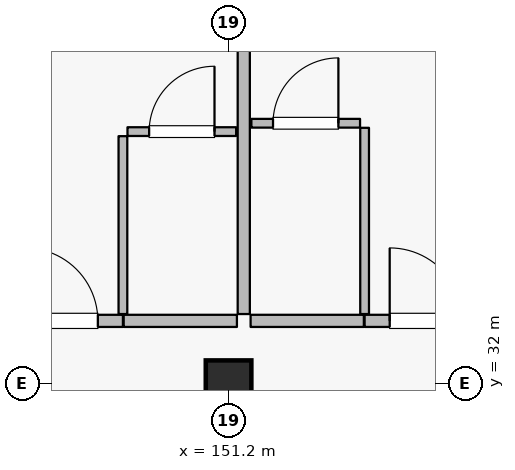
"""IFC4 building model, lengths in metres.
Left out: names, types, materials, properties, quantities, classifications, styles, units other than length and angle.
Written with IfcOpenShell. Run it as: python <this file> out.ifc"""

import sys

from ifc_helpers import new_model, si_unit, direction, frame, frame_2d, origin, origin_2d, place, context, subcontext, project, spatial, rectangle, extrude, element, fill, save


model = new_model("IFC4")
c1 = context("Model", 3, precision=1e-05, world=origin(), true_north=direction((0.0, 1.0)))
c2 = subcontext(c1, "Body", "Model", "MODEL_VIEW")
j1 = project(units=[si_unit("LENGTHUNIT", "METRE"), si_unit("PLANEANGLEUNIT", "RADIAN")], contexts=[c1])
p1 = place(None, origin())
s1 = spatial("IfcSite", under=j1, at=p1, CompositionType="ELEMENT")
p2 = place(p1, origin())
s2 = spatial("IfcBuilding", under=s1, at=p2, CompositionType="ELEMENT")
p3 = place(p2, frame((0.0, 0.0, 32.4)))
s3 = spatial("IfcBuildingStorey", under=s2, at=p3, CompositionType="ELEMENT", Elevation=32.4)
p4 = place(p3, frame((151.2, 32.0, 0.0), z_axis=(0.0, 0.0, 1.0), x_axis=(1.0, 0.0, 0.0)))
e1 = element("IfcColumn", 1, at=p4, inside=s3, PredefinedType="COLUMN", context=c2, shape_type="SweptSolid", body=[
    extrude(rectangle(XDim=0.6, YDim=0.6, at=origin_2d()), origin(), (0.0, 0.0, 1.0), 3.6),
])
p5 = place(p3, frame((143.15, 32.333, 0.0), z_axis=(0.0, 0.0, 1.0), x_axis=(0.724116091282, 0.689678103427, 0.0)))
e2 = element("IfcWall", 2, at=p5, inside=s3, PredefinedType="SOLIDWALL", context=c2, shape_type="SweptSolid", body=[
    extrude(rectangle(XDim=10.634, YDim=0.24, at=frame_2d((5.317, 0.0))), origin(), (0.0, 0.0, 1.0), 2.94),
])
p6 = place(p5, frame((0.27, 0.0, 0.8)))
e3 = element("IfcOpeningElement", 3, at=p6, cuts=e2, PredefinedType="OPENING", context=c2, shape_type="SweptSolid", body=[
    extrude(rectangle(XDim=1.6, YDim=1.6, at=frame_2d((0.8, 0.8))), frame((0.0, 0.13, 0.0), z_axis=(0.0, -1.0, 0.0), x_axis=(1.0, 0.0, 0.0)), (0.0, 0.0, 1.0), 0.26),
])
p7 = place(p5, frame((3.757, 0.0, 0.8)))
e4 = element("IfcOpeningElement", 4, at=p7, cuts=e2, PredefinedType="OPENING", context=c2, shape_type="SweptSolid", body=[
    extrude(rectangle(XDim=1.6, YDim=1.6, at=frame_2d((0.8, 0.8))), frame((0.0, 0.13, 0.0), z_axis=(0.0, -1.0, 0.0), x_axis=(1.0, 0.0, 0.0)), (0.0, 0.0, 1.0), 0.26),
])
p8 = place(p5, frame((8.004, 0.0, 0.8)))
e5 = element("IfcOpeningElement", 5, at=p8, cuts=e2, PredefinedType="OPENING", context=c2, shape_type="SweptSolid", body=[
    extrude(rectangle(XDim=1.6, YDim=1.6, at=frame_2d((0.8, 0.8))), frame((0.0, 0.13, 0.0), z_axis=(0.0, -1.0, 0.0), x_axis=(1.0, 0.0, 0.0)), (0.0, 0.0, 1.0), 0.26),
])
p9 = place(p3, frame((148.19, 32.82, 0.0), z_axis=(0.0, 0.0, 1.0), x_axis=(1.0, 0.0, 0.0)))
e6 = element("IfcWall", 6, at=p9, inside=s3, PredefinedType="PARTITIONING", context=c2, shape_type="SweptSolid", body=[
    extrude(rectangle(XDim=1.62, YDim=0.16, at=frame_2d((0.81, 0.0))), origin(), (0.0, 0.0, 1.0), 3.335),
])
p10 = place(p9, frame((0.33, 0.0, 0.0)))
e7 = element("IfcOpeningElement", 7, at=p10, cuts=e6, PredefinedType="OPENING", context=c2, shape_type="SweptSolid", body=[
    extrude(rectangle(XDim=0.96, YDim=2.2, at=frame_2d((0.48, 1.1))), frame((0.0, 0.09, 0.0), z_axis=(0.0, -1.0, 0.0), x_axis=(1.0, 0.0, 0.0)), (0.0, 0.0, 1.0), 0.18),
])
p11 = place(p3, frame((149.82, 32.82, 0.0), z_axis=(0.0, 0.0, 1.0), x_axis=(1.0, 0.0, 0.0)))
e8 = element("IfcWall", 8, at=p11, inside=s3, PredefinedType="PARTITIONING", context=c2, shape_type="SweptSolid", body=[
    extrude(rectangle(XDim=1.49, YDim=0.16, at=frame_2d((0.745, 0.0))), origin(), (0.0, 0.0, 1.0), 3.335),
])
p12 = place(p3, frame((149.81, 32.91, 0.0), z_axis=(0.0, 0.0, 1.0), x_axis=(0.0, 1.0, 0.0)))
e9 = element("IfcWall", 9, at=p12, inside=s3, PredefinedType="PARTITIONING", context=c2, shape_type="SweptSolid", body=[
    extrude(rectangle(XDim=2.34, YDim=0.115, at=frame_2d((1.17, 0.0))), origin(), (0.0, 0.0, 1.0), 3.335),
])
p13 = place(p3, frame((149.87, 35.31, 0.0), z_axis=(0.0, 0.0, 1.0), x_axis=(1.0, 0.0, 0.0)))
e10 = element("IfcWall", 10, at=p13, inside=s3, PredefinedType="PARTITIONING", context=c2, shape_type="SweptSolid", body=[
    extrude(rectangle(XDim=1.43, YDim=0.115, at=frame_2d((0.715, 0.0))), origin(), (0.0, 0.0, 1.0), 3.335),
])
p14 = place(p13, frame((0.285, 0.0, 0.0)))
e11 = element("IfcOpeningElement", 11, at=p14, cuts=e10, PredefinedType="OPENING", context=c2, shape_type="SweptSolid", body=[
    extrude(rectangle(XDim=0.86, YDim=2.12, at=frame_2d((0.43, 1.06))), frame((0.0, 0.067, 0.0), z_axis=(0.0, -1.0, 0.0), x_axis=(1.0, 0.0, 0.0)), (0.0, 0.0, 1.0), 0.135),
])
p15 = place(p3, frame((151.49, 32.82, 0.0), z_axis=(0.0, 0.0, 1.0), x_axis=(1.0, 0.0, 0.0)))
e12 = element("IfcWall", 12, at=p15, inside=s3, PredefinedType="PARTITIONING", context=c2, shape_type="SweptSolid", body=[
    extrude(rectangle(XDim=1.49, YDim=0.16, at=frame_2d((0.745, 0.0))), origin(), (0.0, 0.0, 1.0), 3.335),
])
p16 = place(p3, frame((152.99, 32.82, 0.0), z_axis=(0.0, 0.0, 1.0), x_axis=(1.0, 0.0, 0.0)))
e13 = element("IfcWall", 13, at=p16, inside=s3, PredefinedType="PARTITIONING", context=c2, shape_type="SweptSolid", body=[
    extrude(rectangle(XDim=1.62, YDim=0.16, at=frame_2d((0.81, 0.0))), origin(), (0.0, 0.0, 1.0), 3.335),
])
p17 = place(p16, frame((0.33, 0.0, 0.0)))
e14 = element("IfcOpeningElement", 14, at=p17, cuts=e13, PredefinedType="OPENING", context=c2, shape_type="SweptSolid", body=[
    extrude(rectangle(XDim=0.96, YDim=2.2, at=frame_2d((0.48, 1.1))), frame((0.0, 0.09, 0.0), z_axis=(0.0, -1.0, 0.0), x_axis=(1.0, 0.0, 0.0)), (0.0, 0.0, 1.0), 0.18),
])
p18 = place(p3, frame((152.99, 32.91, 0.0), z_axis=(0.0, 0.0, 1.0), x_axis=(0.0, 1.0, 0.0)))
e15 = element("IfcWall", 15, at=p18, inside=s3, PredefinedType="PARTITIONING", context=c2, shape_type="SweptSolid", body=[
    extrude(rectangle(XDim=2.45, YDim=0.115, at=frame_2d((1.225, 0.0))), origin(), (0.0, 0.0, 1.0), 3.335),
])
p19 = place(p3, frame((151.5, 35.42, 0.0), z_axis=(0.0, 0.0, 1.0), x_axis=(1.0, 0.0, 0.0)))
e16 = element("IfcWall", 16, at=p19, inside=s3, PredefinedType="PARTITIONING", context=c2, shape_type="SweptSolid", body=[
    extrude(rectangle(XDim=1.43, YDim=0.115, at=frame_2d((0.715, 0.0))), origin(), (0.0, 0.0, 1.0), 3.335),
])
p20 = place(p19, frame((0.285, 0.0, 0.0)))
e17 = element("IfcOpeningElement", 17, at=p20, cuts=e16, PredefinedType="OPENING", context=c2, shape_type="SweptSolid", body=[
    extrude(rectangle(XDim=0.86, YDim=2.12, at=frame_2d((0.43, 1.06))), frame((0.0, 0.067, 0.0), z_axis=(0.0, -1.0, 0.0), x_axis=(1.0, 0.0, 0.0)), (0.0, 0.0, 1.0), 0.135),
])
p21 = place(p3, frame((151.4, 32.91, 0.0), z_axis=(0.0, 0.0, 1.0), x_axis=(0.0, 1.0, 0.0)))
e18 = element("IfcWall", 18, at=p21, inside=s3, PredefinedType="PARTITIONING", context=c2, shape_type="SweptSolid", body=[
    extrude(rectangle(XDim=6.75, YDim=0.16, at=frame_2d((3.375, 0.0))), origin(), (0.0, 0.0, 1.0), 2.74),
])
p22 = place(p10, origin())
e19 = element("IfcDoor", 19, at=p22, inside=s3, OperationType="SINGLE_SWING_LEFT", PredefinedType="DOOR", context=c2, shape_type="SweptSolid", body=[
    extrude(rectangle(XDim=0.96, YDim=2.2, at=frame_2d((0.48, 1.1))), frame((0.0, 0.025, 0.0), z_axis=(0.0, -1.0, 0.0), x_axis=(1.0, 0.0, 0.0)), (0.0, 0.0, 1.0), 0.05),
])
fill(e7, e19)
p23 = place(p14, origin())
e20 = element("IfcDoor", 20, at=p23, inside=s3, OperationType="SINGLE_SWING_RIGHT", PredefinedType="DOOR", context=c2, shape_type="SweptSolid", body=[
    extrude(rectangle(XDim=0.86, YDim=2.12, at=frame_2d((0.43, 1.06))), frame((0.0, 0.025, 0.0), z_axis=(0.0, -1.0, 0.0), x_axis=(1.0, 0.0, 0.0)), (0.0, 0.0, 1.0), 0.05),
])
fill(e11, e20)
p24 = place(p17, origin())
e21 = element("IfcDoor", 21, at=p24, inside=s3, OperationType="SINGLE_SWING_LEFT", PredefinedType="DOOR", context=c2, shape_type="SweptSolid", body=[
    extrude(rectangle(XDim=0.96, YDim=2.2, at=frame_2d((0.48, 1.1))), frame((0.0, 0.025, 0.0), z_axis=(0.0, -1.0, 0.0), x_axis=(1.0, 0.0, 0.0)), (0.0, 0.0, 1.0), 0.05),
])
fill(e14, e21)
p25 = place(p20, origin())
e22 = element("IfcDoor", 22, at=p25, inside=s3, OperationType="SINGLE_SWING_RIGHT", PredefinedType="DOOR", context=c2, shape_type="SweptSolid", body=[
    extrude(rectangle(XDim=0.86, YDim=2.12, at=frame_2d((0.43, 1.06))), frame((0.0, 0.025, 0.0), z_axis=(0.0, -1.0, 0.0), x_axis=(1.0, 0.0, 0.0)), (0.0, 0.0, 1.0), 0.05),
])
fill(e17, e22)
save(model, sys.argv[1])
